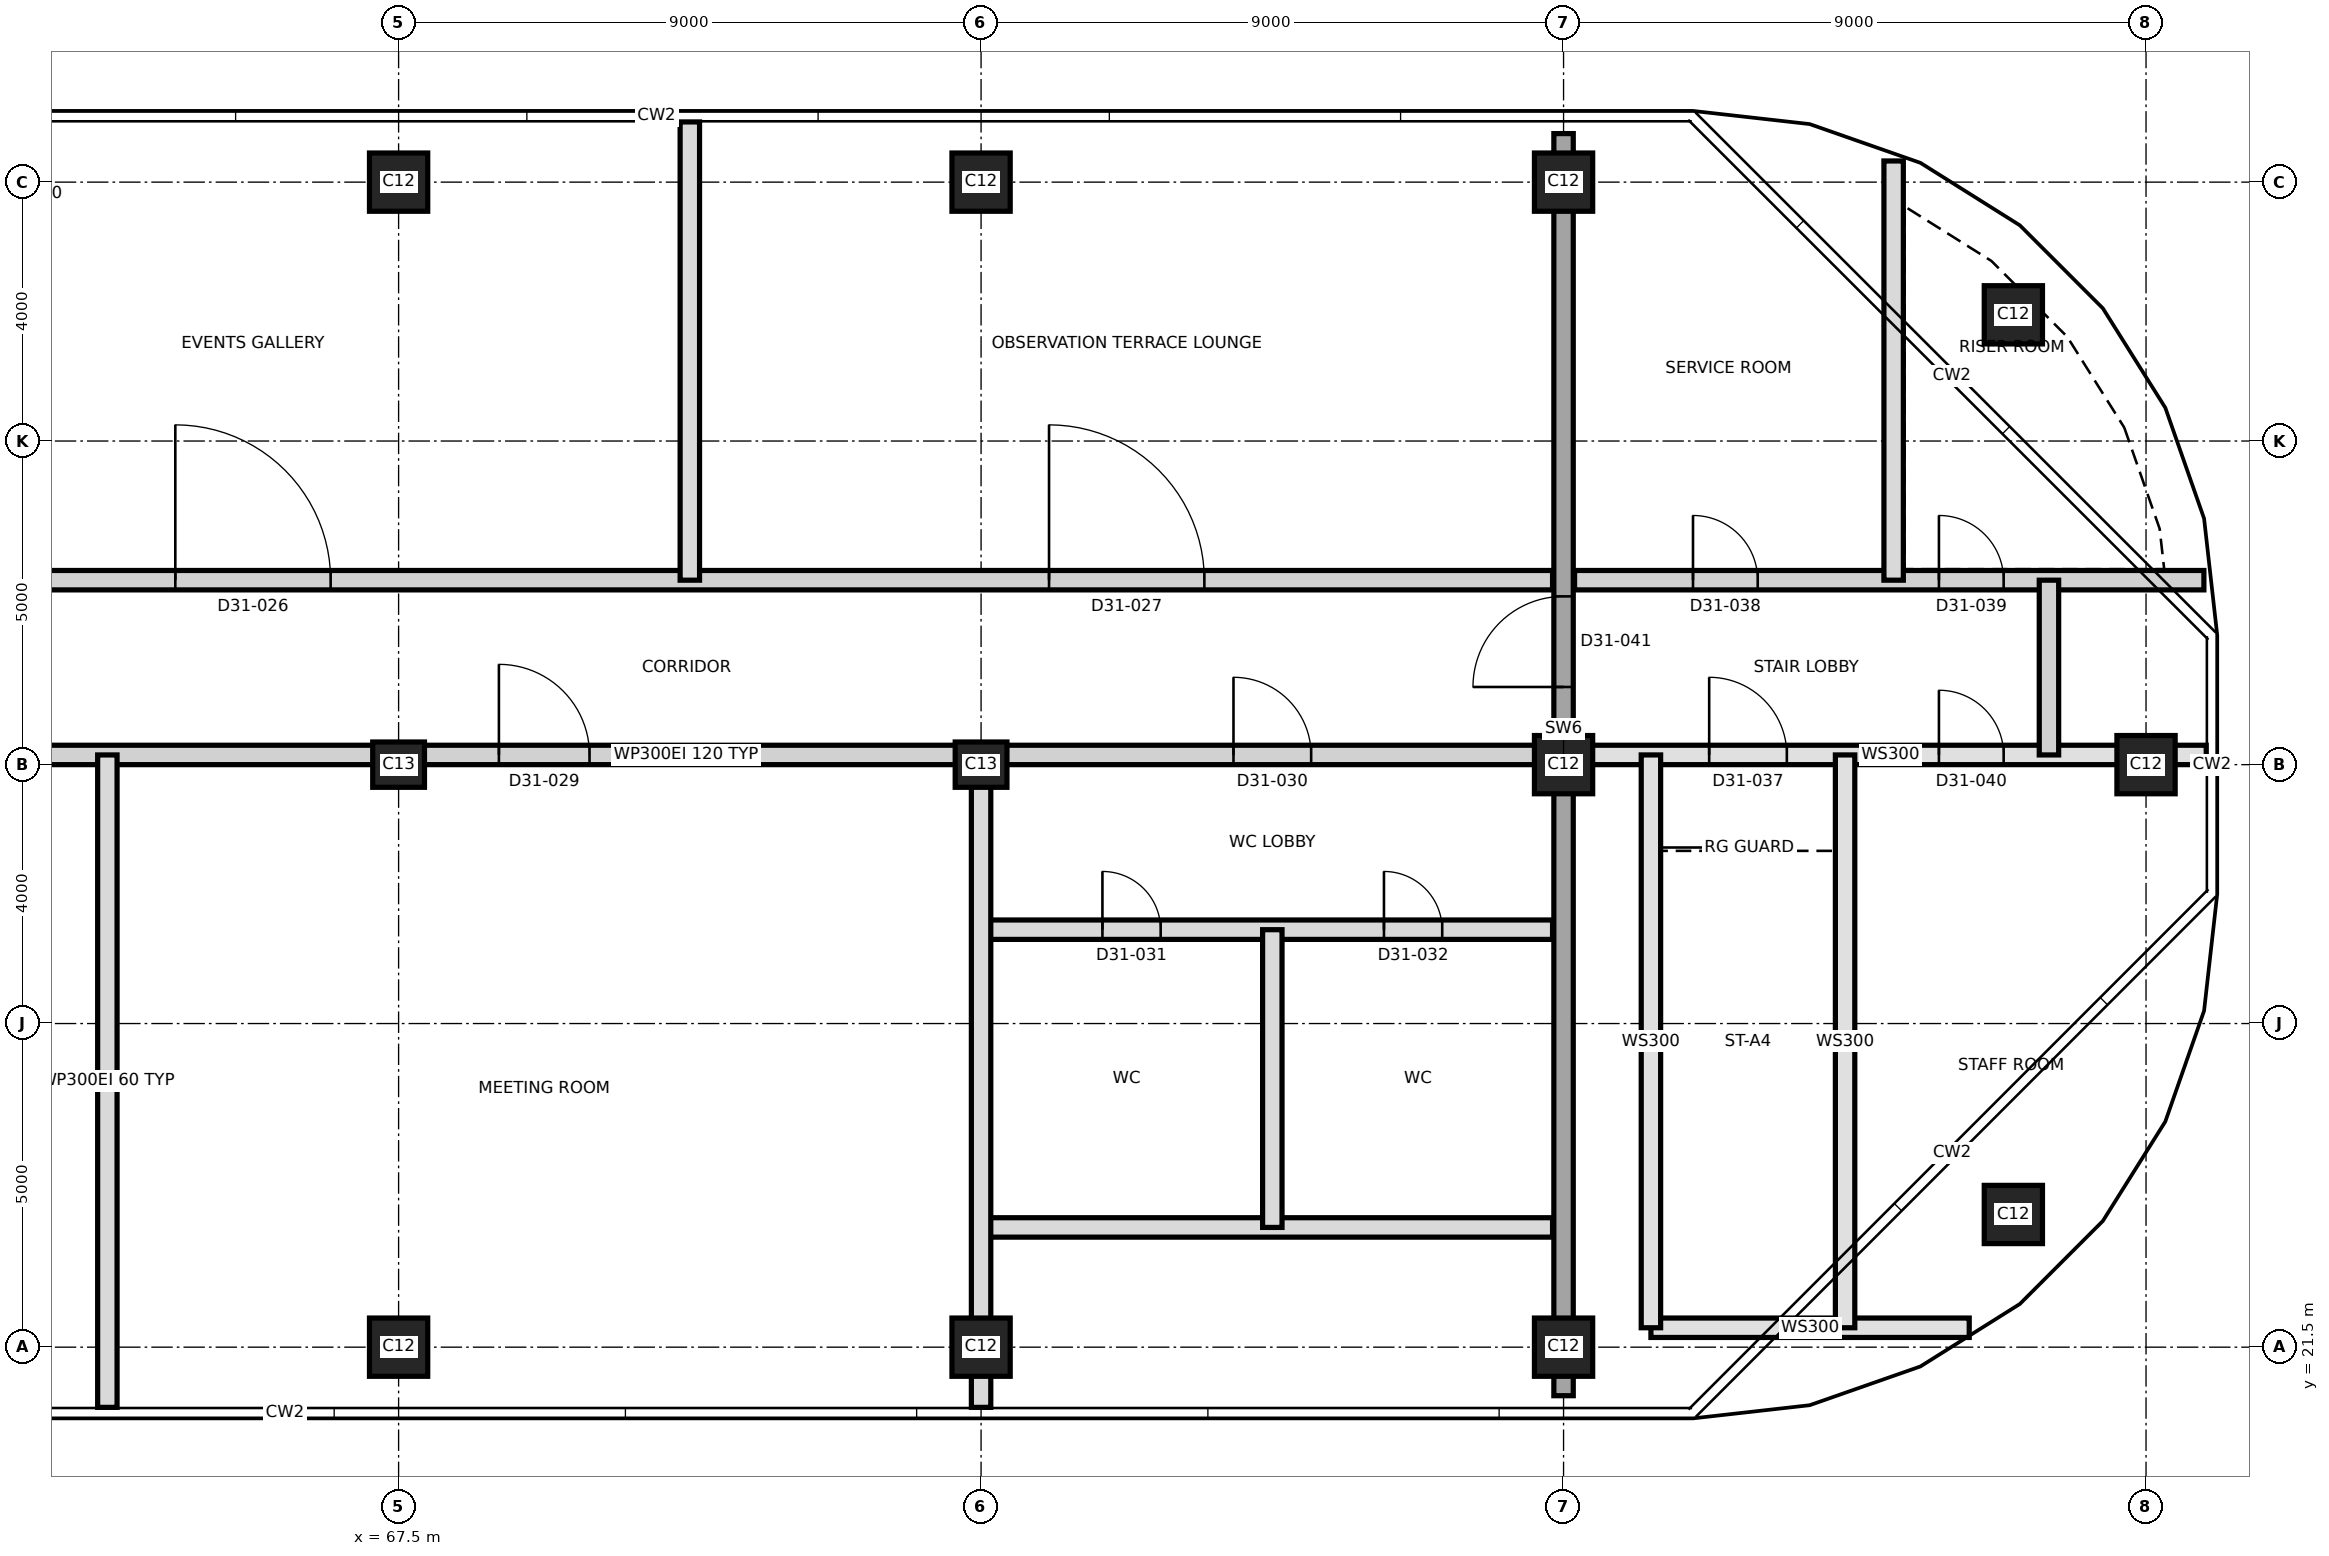
"""IFC4 building model, lengths in metres.
Left out: names, types, materials, properties, quantities, classifications, styles, units other than length and angle.
Written with IfcOpenShell. Run it as: python <this file> out.ifc"""

import sys

from ifc_helpers import new_model, si_unit, direction, frame, frame_2d, origin, origin_2d, place, context, subcontext, project, spatial, rectangle, extrude, element, fill, save


model = new_model("IFC4")
c1 = context("Model", 3, precision=1e-05, world=origin(), true_north=direction((0.0, 1.0)))
c2 = subcontext(c1, "Body", "Model", "MODEL_VIEW")
j1 = project(units=[si_unit("LENGTHUNIT", "METRE"), si_unit("PLANEANGLEUNIT", "RADIAN")], contexts=[c1])
p1 = place(None, origin())
s1 = spatial("IfcSite", under=j1, at=p1, CompositionType="ELEMENT")
p2 = place(p1, origin())
s2 = spatial("IfcBuilding", under=s1, at=p2, CompositionType="ELEMENT")
p3 = place(p2, frame((0.0, 0.0, 266.9)))
s3 = spatial("IfcBuildingStorey", under=s2, at=p3, CompositionType="ELEMENT", Elevation=266.9)
for number, where, z_axis, x_axis in (
    (1, (67.5, 21.5, 0.0), (0.0, 0.0, 1.0), (1.0, 0.0, 0.0)),
    (2, (76.5, 21.5, 0.0), (0.0, 0.0, 1.0), (1.0, 0.0, 0.0)),
    (3, (85.5, 21.5, 0.0), (0.0, 0.0, 1.0), (1.0, 0.0, 0.0)),
    (4, (92.45, 23.55, 0.0), (0.0, 0.0, 1.0), (1.0, 0.0, 0.0)),
):
    element("IfcColumn", number, at=place(p3, frame(where, z_axis=z_axis, x_axis=x_axis)), inside=s3, PredefinedType="COLUMN", context=c2, shape_type="SweptSolid", body=[
        extrude(rectangle(XDim=0.9, YDim=0.9, at=origin_2d()), origin(), (0.0, 0.0, 1.0), 6.0),
    ])
for number, where, z_axis, x_axis in (
    (5, (67.5, 30.5, 0.0), (0.0, 0.0, 1.0), (1.0, 0.0, 0.0)),
    (6, (76.5, 30.5, 0.0), (0.0, 0.0, 1.0), (1.0, 0.0, 0.0)),
):
    element("IfcColumn", number, at=place(p3, frame(where, z_axis=z_axis, x_axis=x_axis)), inside=s3, PredefinedType="COLUMN", context=c2, shape_type="SweptSolid", body=[
        extrude(rectangle(XDim=0.8, YDim=0.7, at=origin_2d()), origin(), (0.0, 0.0, 1.0), 6.0),
    ])
for number, where, z_axis, x_axis in (
    (7, (85.5, 30.5, 0.0), (0.0, 0.0, 1.0), (1.0, 0.0, 0.0)),
    (8, (94.5, 30.5, 0.0), (0.0, 0.0, 1.0), (1.0, 0.0, 0.0)),
    (9, (92.45, 37.45, 0.0), (0.0, 0.0, 1.0), (1.0, 0.0, 0.0)),
    (10, (67.5, 39.5, 0.0), (0.0, 0.0, 1.0), (1.0, 0.0, 0.0)),
    (11, (76.5, 39.5, 0.0), (0.0, 0.0, 1.0), (1.0, 0.0, 0.0)),
    (12, (85.5, 39.5, 0.0), (0.0, 0.0, 1.0), (1.0, 0.0, 0.0)),
):
    element("IfcColumn", number, at=place(p3, frame(where, z_axis=z_axis, x_axis=x_axis)), inside=s3, PredefinedType="COLUMN", context=c2, shape_type="SweptSolid", body=[
        extrude(rectangle(XDim=0.9, YDim=0.9, at=origin_2d()), origin(), (0.0, 0.0, 1.0), 6.0),
    ])
p4 = place(p3, frame((85.5, 20.75, 0.0), z_axis=(0.0, 0.0, 1.0), x_axis=(0.0, 1.0, 0.0)))
e13 = element("IfcWall", 13, at=p4, inside=s3, PredefinedType="SHEAR", context=c2, shape_type="SweptSolid", body=[
    extrude(rectangle(XDim=19.5, YDim=0.3, at=frame_2d((9.75, 0.0))), origin(), (0.0, 0.0, 1.0), 6.0),
])
p5 = place(p4, frame((10.95, 0.0, 0.0)))
e14 = element("IfcOpeningElement", 14, at=p5, cuts=e13, PredefinedType="OPENING", context=c2, shape_type="SweptSolid", body=[
    extrude(rectangle(XDim=1.4, YDim=2.1, at=frame_2d((0.7, 1.05))), frame((0.0, 0.16, 0.0), z_axis=(0.0, -1.0, 0.0), x_axis=(1.0, 0.0, 0.0)), (0.0, 0.0, 1.0), 0.32),
])
p6 = place(p3, frame((86.85, 21.8, 0.0), z_axis=(0.0, 0.0, 1.0), x_axis=(1.0, 0.0, 0.0)))
e15 = element("IfcWall", 15, at=p6, inside=s3, PredefinedType="SOLIDWALL", context=c2, shape_type="SweptSolid", body=[
    extrude(rectangle(XDim=4.918, YDim=0.3, at=frame_2d((2.459, 0.0))), origin(), (0.0, 0.0, 1.0), 5.7),
])
p7 = place(p3, frame((76.5, 23.35, 0.0), z_axis=(0.0, 0.0, 1.0), x_axis=(1.0, 0.0, 0.0)))
e16 = element("IfcWall", 16, at=p7, inside=s3, PredefinedType="PARTITIONING", context=c2, shape_type="SweptSolid", body=[
    extrude(rectangle(XDim=8.83, YDim=0.3, at=frame_2d((4.415, 0.0))), origin(), (0.0, 0.0, 1.0), 5.7),
])
p8 = place(p3, frame((76.5, 27.95, 0.0), z_axis=(0.0, 0.0, 1.0), x_axis=(1.0, 0.0, 0.0)))
e17 = element("IfcWall", 17, at=p8, inside=s3, PredefinedType="PARTITIONING", context=c2, shape_type="SweptSolid", body=[
    extrude(rectangle(XDim=8.83, YDim=0.3, at=frame_2d((4.415, 0.0))), origin(), (0.0, 0.0, 1.0), 5.7),
])
p9 = place(p8, frame((1.875, 0.0, 0.0)))
e18 = element("IfcOpeningElement", 18, at=p9, cuts=e17, PredefinedType="OPENING", context=c2, shape_type="SweptSolid", body=[
    extrude(rectangle(XDim=0.9, YDim=2.1, at=frame_2d((0.45, 1.05))), frame((0.0, 0.16, 0.0), z_axis=(0.0, -1.0, 0.0), x_axis=(1.0, 0.0, 0.0)), (0.0, 0.0, 1.0), 0.32),
])
p10 = place(p8, frame((6.225, 0.0, 0.0)))
e19 = element("IfcOpeningElement", 19, at=p10, cuts=e17, PredefinedType="OPENING", context=c2, shape_type="SweptSolid", body=[
    extrude(rectangle(XDim=0.9, YDim=2.1, at=frame_2d((0.45, 1.05))), frame((0.0, 0.16, 0.0), z_axis=(0.0, -1.0, 0.0), x_axis=(1.0, 0.0, 0.0)), (0.0, 0.0, 1.0), 0.32),
])
p11 = place(p3, frame((58.55, 30.65, 0.0), z_axis=(0.0, 0.0, 1.0), x_axis=(1.0, 0.0, 0.0)))
e20 = element("IfcWall", 20, at=p11, inside=s3, PredefinedType="PARTITIONING", context=c2, shape_type="SweptSolid", body=[
    extrude(rectangle(XDim=26.78, YDim=0.3, at=frame_2d((13.39, 0.0))), origin(), (0.0, 0.0, 1.0), 5.7),
])
p12 = place(p11, frame((1.5, 0.0, 0.0)))
e21 = element("IfcOpeningElement", 21, at=p12, cuts=e20, PredefinedType="OPENING", context=c2, shape_type="SweptSolid", body=[
    extrude(rectangle(XDim=1.4, YDim=2.1, at=frame_2d((0.7, 1.05))), frame((0.0, 0.16, 0.0), z_axis=(0.0, -1.0, 0.0), x_axis=(1.0, 0.0, 0.0)), (0.0, 0.0, 1.0), 0.32),
])
p13 = place(p11, frame((10.5, 0.0, 0.0)))
e22 = element("IfcOpeningElement", 22, at=p13, cuts=e20, PredefinedType="OPENING", context=c2, shape_type="SweptSolid", body=[
    extrude(rectangle(XDim=1.4, YDim=2.1, at=frame_2d((0.7, 1.05))), frame((0.0, 0.16, 0.0), z_axis=(0.0, -1.0, 0.0), x_axis=(1.0, 0.0, 0.0)), (0.0, 0.0, 1.0), 0.32),
])
p14 = place(p11, frame((21.85, 0.0, 0.0)))
e23 = element("IfcOpeningElement", 23, at=p14, cuts=e20, PredefinedType="OPENING", context=c2, shape_type="SweptSolid", body=[
    extrude(rectangle(XDim=1.2, YDim=2.1, at=frame_2d((0.6, 1.05))), frame((0.0, 0.16, 0.0), z_axis=(0.0, -1.0, 0.0), x_axis=(1.0, 0.0, 0.0)), (0.0, 0.0, 1.0), 0.32),
])
p15 = place(p3, frame((85.67, 30.65, 0.0), z_axis=(0.0, 0.0, 1.0), x_axis=(1.0, 0.0, 0.0)))
e24 = element("IfcWall", 24, at=p15, inside=s3, PredefinedType="SOLIDWALL", context=c2, shape_type="SweptSolid", body=[
    extrude(rectangle(XDim=9.76, YDim=0.3, at=frame_2d((4.88, 0.0))), origin(), (0.0, 0.0, 1.0), 5.7),
])
p16 = place(p15, frame((2.08, 0.0, 0.0)))
e25 = element("IfcOpeningElement", 25, at=p16, cuts=e24, PredefinedType="OPENING", context=c2, shape_type="SweptSolid", body=[
    extrude(rectangle(XDim=1.2, YDim=2.1, at=frame_2d((0.6, 1.05))), frame((0.0, 0.16, 0.0), z_axis=(0.0, -1.0, 0.0), x_axis=(1.0, 0.0, 0.0)), (0.0, 0.0, 1.0), 0.32),
])
p17 = place(p15, frame((5.63, 0.0, 0.0)))
e26 = element("IfcOpeningElement", 26, at=p17, cuts=e24, PredefinedType="OPENING", context=c2, shape_type="SweptSolid", body=[
    extrude(rectangle(XDim=1.0, YDim=2.1, at=frame_2d((0.5, 1.05))), frame((0.0, 0.16, 0.0), z_axis=(0.0, -1.0, 0.0), x_axis=(1.0, 0.0, 0.0)), (0.0, 0.0, 1.0), 0.32),
])
p18 = place(p3, frame((58.55, 33.35, 0.0), z_axis=(0.0, 0.0, 1.0), x_axis=(1.0, 0.0, 0.0)))
e27 = element("IfcWall", 27, at=p18, inside=s3, PredefinedType="PARTITIONING", context=c2, shape_type="SweptSolid", body=[
    extrude(rectangle(XDim=26.78, YDim=0.3, at=frame_2d((13.39, 0.0))), origin(), (0.0, 0.0, 1.0), 5.7),
])
p19 = place(p18, frame((5.5, 0.0, 0.0)))
e28 = element("IfcOpeningElement", 28, at=p19, cuts=e27, PredefinedType="OPENING", context=c2, shape_type="SweptSolid", body=[
    extrude(rectangle(XDim=2.4, YDim=2.4, at=frame_2d((1.2, 1.2))), frame((0.0, 0.16, 0.0), z_axis=(0.0, -1.0, 0.0), x_axis=(1.0, 0.0, 0.0)), (0.0, 0.0, 1.0), 0.32),
])
p20 = place(p18, frame((19.0, 0.0, 0.0)))
e29 = element("IfcOpeningElement", 29, at=p20, cuts=e27, PredefinedType="OPENING", context=c2, shape_type="SweptSolid", body=[
    extrude(rectangle(XDim=2.4, YDim=2.4, at=frame_2d((1.2, 1.2))), frame((0.0, 0.16, 0.0), z_axis=(0.0, -1.0, 0.0), x_axis=(1.0, 0.0, 0.0)), (0.0, 0.0, 1.0), 0.32),
])
p21 = place(p3, frame((85.67, 33.35, 0.0), z_axis=(0.0, 0.0, 1.0), x_axis=(1.0, 0.0, 0.0)))
e30 = element("IfcWall", 30, at=p21, inside=s3, PredefinedType="PARTITIONING", context=c2, shape_type="SweptSolid", body=[
    extrude(rectangle(XDim=9.724, YDim=0.3, at=frame_2d((4.862, 0.0))), origin(), (0.0, 0.0, 1.0), 5.7),
])
p22 = place(p21, frame((1.83, 0.0, 0.0)))
e31 = element("IfcOpeningElement", 31, at=p22, cuts=e30, PredefinedType="OPENING", context=c2, shape_type="SweptSolid", body=[
    extrude(rectangle(XDim=1.0, YDim=2.1, at=frame_2d((0.5, 1.05))), frame((0.0, 0.16, 0.0), z_axis=(0.0, -1.0, 0.0), x_axis=(1.0, 0.0, 0.0)), (0.0, 0.0, 1.0), 0.32),
])
p23 = place(p21, frame((5.63, 0.0, 0.0)))
e32 = element("IfcOpeningElement", 32, at=p23, cuts=e30, PredefinedType="OPENING", context=c2, shape_type="SweptSolid", body=[
    extrude(rectangle(XDim=1.0, YDim=2.1, at=frame_2d((0.5, 1.05))), frame((0.0, 0.16, 0.0), z_axis=(0.0, -1.0, 0.0), x_axis=(1.0, 0.0, 0.0)), (0.0, 0.0, 1.0), 0.32),
])
p24 = place(p3, frame((63.0, 20.57, 0.0), z_axis=(0.0, 0.0, 1.0), x_axis=(0.0, 1.0, 0.0)))
e33 = element("IfcWall", 33, at=p24, inside=s3, PredefinedType="PARTITIONING", context=c2, shape_type="SweptSolid", body=[
    extrude(rectangle(XDim=10.08, YDim=0.3, at=frame_2d((5.04, 0.0))), origin(), (0.0, 0.0, 1.0), 5.7),
])
p25 = place(p3, frame((72.0, 33.35, 0.0), z_axis=(0.0, 0.0, 1.0), x_axis=(0.0, 1.0, 0.0)))
e34 = element("IfcWall", 34, at=p25, inside=s3, PredefinedType="PARTITIONING", context=c2, shape_type="SweptSolid", body=[
    extrude(rectangle(XDim=7.08, YDim=0.3, at=frame_2d((3.54, 0.0))), origin(), (0.0, 0.0, 1.0), 5.7),
])
p26 = place(p3, frame((76.5, 20.57, 0.0), z_axis=(0.0, 0.0, 1.0), x_axis=(0.0, 1.0, 0.0)))
e35 = element("IfcWall", 35, at=p26, inside=s3, PredefinedType="PARTITIONING", context=c2, shape_type="SweptSolid", body=[
    extrude(rectangle(XDim=10.08, YDim=0.3, at=frame_2d((5.04, 0.0))), origin(), (0.0, 0.0, 1.0), 5.7),
])
p27 = place(p3, frame((81.0, 23.35, 0.0), z_axis=(0.0, 0.0, 1.0), x_axis=(0.0, 1.0, 0.0)))
e36 = element("IfcWall", 36, at=p27, inside=s3, PredefinedType="PARTITIONING", context=c2, shape_type="SweptSolid", body=[
    extrude(rectangle(XDim=4.6, YDim=0.3, at=frame_2d((2.3, 0.0))), origin(), (0.0, 0.0, 1.0), 5.7),
])
for number, where, z_axis, x_axis in (
    (37, (86.85, 21.8, 0.0), (0.0, 0.0, 1.0), (0.0, 1.0, 0.0)),
    (38, (89.85, 21.8, 0.0), (0.0, 0.0, 1.0), (0.0, 1.0, 0.0)),
):
    element("IfcWall", number, at=place(p3, frame(where, z_axis=z_axis, x_axis=x_axis)), inside=s3, PredefinedType="SOLIDWALL", context=c2, shape_type="SweptSolid", body=[
        extrude(rectangle(XDim=8.85, YDim=0.3, at=frame_2d((4.425, 0.0))), origin(), (0.0, 0.0, 1.0), 5.7),
    ])
p28 = place(p3, frame((90.6, 33.35, 0.0), z_axis=(0.0, 0.0, 1.0), x_axis=(0.0, 1.0, 0.0)))
e39 = element("IfcWall", 39, at=p28, inside=s3, PredefinedType="PARTITIONING", context=c2, shape_type="SweptSolid", body=[
    extrude(rectangle(XDim=6.477, YDim=0.3, at=frame_2d((3.238, 0.0))), origin(), (0.0, 0.0, 1.0), 5.7),
])
p29 = place(p3, frame((93.0, 30.65, 0.0), z_axis=(0.0, 0.0, 1.0), x_axis=(0.0, 1.0, 0.0)))
e40 = element("IfcWall", 40, at=p29, inside=s3, PredefinedType="PARTITIONING", context=c2, shape_type="SweptSolid", body=[
    extrude(rectangle(XDim=2.7, YDim=0.3, at=frame_2d((1.35, 0.0))), origin(), (0.0, 0.0, 1.0), 5.7),
])
p30 = place(p19, origin())
e41 = element("IfcDoor", 41, at=p30, inside=s3, OperationType="SINGLE_SWING_LEFT", PredefinedType="DOOR", context=c2, shape_type="SweptSolid", body=[
    extrude(rectangle(XDim=2.4, YDim=2.4, at=frame_2d((1.2, 1.2))), frame((0.0, 0.025, 0.0), z_axis=(0.0, -1.0, 0.0), x_axis=(1.0, 0.0, 0.0)), (0.0, 0.0, 1.0), 0.05),
])
fill(e28, e41)
p31 = place(p20, origin())
e42 = element("IfcDoor", 42, at=p31, inside=s3, OperationType="SINGLE_SWING_LEFT", PredefinedType="DOOR", context=c2, shape_type="SweptSolid", body=[
    extrude(rectangle(XDim=2.4, YDim=2.4, at=frame_2d((1.2, 1.2))), frame((0.0, 0.025, 0.0), z_axis=(0.0, -1.0, 0.0), x_axis=(1.0, 0.0, 0.0)), (0.0, 0.0, 1.0), 0.05),
])
fill(e29, e42)
p32 = place(p13, origin())
e43 = element("IfcDoor", 43, at=p32, inside=s3, OperationType="SINGLE_SWING_LEFT", PredefinedType="DOOR", context=c2, shape_type="SweptSolid", body=[
    extrude(rectangle(XDim=1.4, YDim=2.1, at=frame_2d((0.7, 1.05))), frame((0.0, 0.025, 0.0), z_axis=(0.0, -1.0, 0.0), x_axis=(1.0, 0.0, 0.0)), (0.0, 0.0, 1.0), 0.05),
])
fill(e22, e43)
p33 = place(p14, origin())
e44 = element("IfcDoor", 44, at=p33, inside=s3, OperationType="SINGLE_SWING_LEFT", PredefinedType="DOOR", context=c2, shape_type="SweptSolid", body=[
    extrude(rectangle(XDim=1.2, YDim=2.1, at=frame_2d((0.6, 1.05))), frame((0.0, 0.025, 0.0), z_axis=(0.0, -1.0, 0.0), x_axis=(1.0, 0.0, 0.0)), (0.0, 0.0, 1.0), 0.05),
])
fill(e23, e44)
p34 = place(p9, origin())
e45 = element("IfcDoor", 45, at=p34, inside=s3, OperationType="SINGLE_SWING_LEFT", PredefinedType="DOOR", context=c2, shape_type="SweptSolid", body=[
    extrude(rectangle(XDim=0.9, YDim=2.1, at=frame_2d((0.45, 1.05))), frame((0.0, 0.025, 0.0), z_axis=(0.0, -1.0, 0.0), x_axis=(1.0, 0.0, 0.0)), (0.0, 0.0, 1.0), 0.05),
])
fill(e18, e45)
p35 = place(p10, origin())
e46 = element("IfcDoor", 46, at=p35, inside=s3, OperationType="SINGLE_SWING_RIGHT", PredefinedType="DOOR", context=c2, shape_type="SweptSolid", body=[
    extrude(rectangle(XDim=0.9, YDim=2.1, at=frame_2d((0.45, 1.05))), frame((0.0, 0.025, 0.0), z_axis=(0.0, -1.0, 0.0), x_axis=(1.0, 0.0, 0.0)), (0.0, 0.0, 1.0), 0.05),
])
fill(e19, e46)
p36 = place(p16, origin())
e47 = element("IfcDoor", 47, at=p36, inside=s3, OperationType="SINGLE_SWING_LEFT", PredefinedType="DOOR", context=c2, shape_type="SweptSolid", body=[
    extrude(rectangle(XDim=1.2, YDim=2.1, at=frame_2d((0.6, 1.05))), frame((0.0, 0.025, 0.0), z_axis=(0.0, -1.0, 0.0), x_axis=(1.0, 0.0, 0.0)), (0.0, 0.0, 1.0), 0.05),
])
fill(e25, e47)
p37 = place(p22, origin())
e48 = element("IfcDoor", 48, at=p37, inside=s3, OperationType="SINGLE_SWING_LEFT", PredefinedType="DOOR", context=c2, shape_type="SweptSolid", body=[
    extrude(rectangle(XDim=1.0, YDim=2.1, at=frame_2d((0.5, 1.05))), frame((0.0, 0.025, 0.0), z_axis=(0.0, -1.0, 0.0), x_axis=(1.0, 0.0, 0.0)), (0.0, 0.0, 1.0), 0.05),
])
fill(e31, e48)
p38 = place(p23, origin())
e49 = element("IfcDoor", 49, at=p38, inside=s3, OperationType="SINGLE_SWING_RIGHT", PredefinedType="DOOR", context=c2, shape_type="SweptSolid", body=[
    extrude(rectangle(XDim=1.0, YDim=2.1, at=frame_2d((0.5, 1.05))), frame((0.0, 0.025, 0.0), z_axis=(0.0, -1.0, 0.0), x_axis=(1.0, 0.0, 0.0)), (0.0, 0.0, 1.0), 0.05),
])
fill(e32, e49)
p39 = place(p17, origin())
e50 = element("IfcDoor", 50, at=p39, inside=s3, OperationType="SINGLE_SWING_LEFT", PredefinedType="DOOR", context=c2, shape_type="SweptSolid", body=[
    extrude(rectangle(XDim=1.0, YDim=2.1, at=frame_2d((0.5, 1.05))), frame((0.0, 0.025, 0.0), z_axis=(0.0, -1.0, 0.0), x_axis=(1.0, 0.0, 0.0)), (0.0, 0.0, 1.0), 0.05),
])
fill(e26, e50)
p40 = place(p5, origin())
e51 = element("IfcDoor", 51, at=p40, inside=s3, OperationType="SINGLE_SWING_RIGHT", PredefinedType="DOOR", context=c2, shape_type="SweptSolid", body=[
    extrude(rectangle(XDim=1.4, YDim=2.1, at=frame_2d((0.7, 1.05))), frame((0.0, 0.025, 0.0), z_axis=(0.0, -1.0, 0.0), x_axis=(1.0, 0.0, 0.0)), (0.0, 0.0, 1.0), 0.05),
])
fill(e14, e51)
save(model, sys.argv[1])
